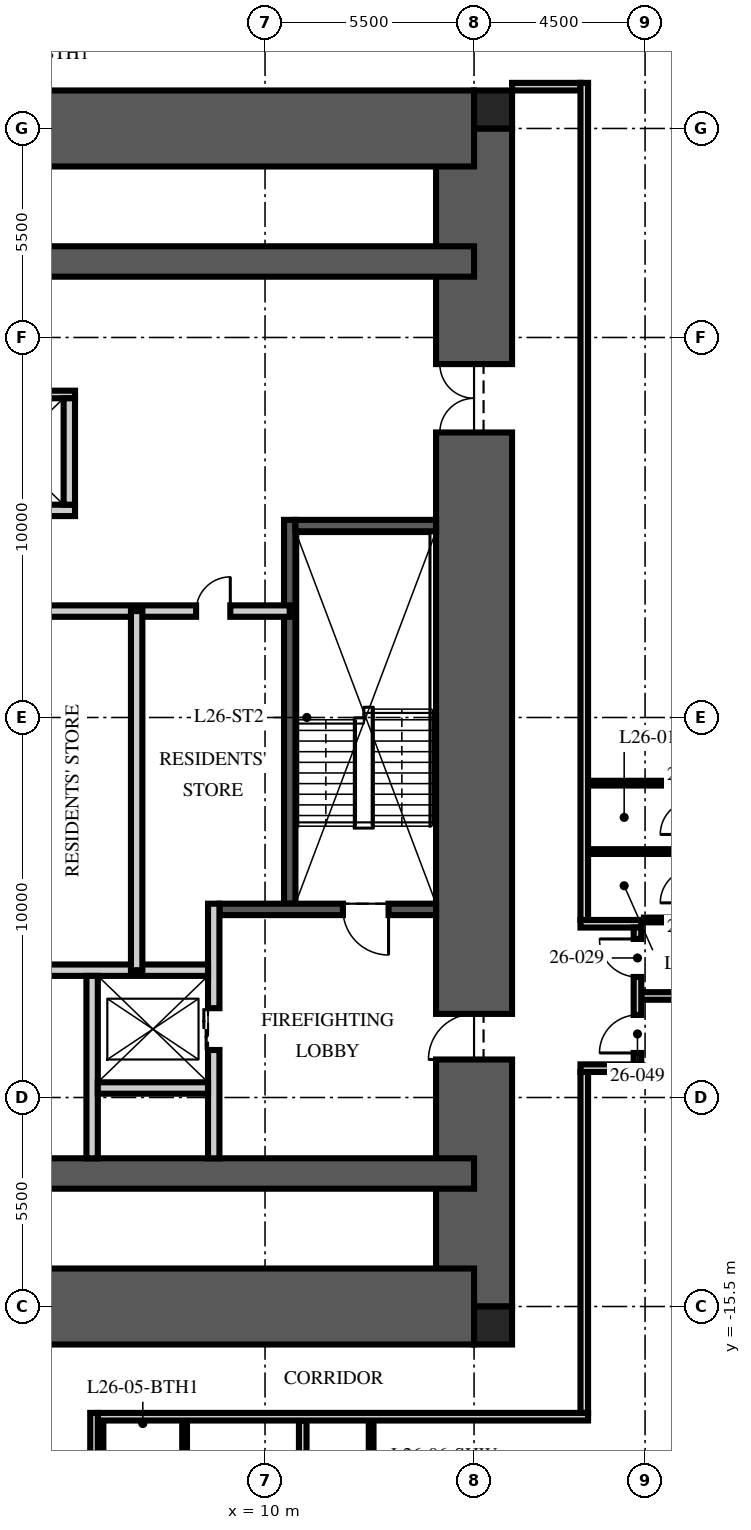
"""IFC4 building model, lengths in metres.
Left out: names, types, materials, properties, quantities, classifications, styles, units other than length and angle.
Written with IfcOpenShell. Run it as: python <this file> out.ifc"""

import sys

from ifc_helpers import new_model, si_unit, direction, frame, frame_2d, origin, origin_2d, place, context, subcontext, project, spatial, rectangle, extrude, element, fill, save


model = new_model("IFC4")
c1 = context("Model", 3, precision=1e-05, world=origin(), true_north=direction((0.0, 1.0)))
c2 = subcontext(c1, "Body", "Model", "MODEL_VIEW")
j1 = project(units=[si_unit("LENGTHUNIT", "METRE"), si_unit("PLANEANGLEUNIT", "RADIAN")], contexts=[c1])
p1 = place(None, origin())
s1 = spatial("IfcSite", under=j1, at=p1, CompositionType="ELEMENT")
p2 = place(p1, origin())
s2 = spatial("IfcBuilding", under=s1, at=p2, CompositionType="ELEMENT")
p3 = place(p2, frame((0.0, 0.0, 107.25)))
s3 = spatial("IfcBuildingStorey", under=s2, at=p3, CompositionType="ELEMENT", Elevation=107.25)
p4 = place(p3, frame((15.5, -15.5, -0.25), z_axis=(0.0, 0.0, 1.0), x_axis=(0.0, 1.0, 0.0)))
e1 = element("IfcWall", 1, at=p4, inside=s3, PredefinedType="SHEAR", context=c2, shape_type="SweptSolid", body=[
    extrude(rectangle(XDim=31.0, YDim=2.0, at=frame_2d((15.5, 0.0))), origin(), (0.0, 0.0, 1.0), 3.75),
])
p5 = place(p4, frame((6.5, 0.0, 0.25)))
e2 = element("IfcOpeningElement", 2, at=p5, cuts=e1, PredefinedType="OPENING", context=c2, shape_type="SweptSolid", body=[
    extrude(rectangle(XDim=1.2, YDim=2.1, at=frame_2d((0.6, 1.05))), frame((0.0, 1.01, 0.0), z_axis=(0.0, -1.0, 0.0), x_axis=(1.0, 0.0, 0.0)), (0.0, 0.0, 1.0), 2.02),
])
p6 = place(p4, frame((23.0, 0.0, 0.25)))
e3 = element("IfcOpeningElement", 3, at=p6, cuts=e1, PredefinedType="OPENING", context=c2, shape_type="SweptSolid", body=[
    extrude(rectangle(XDim=1.8, YDim=2.1, at=frame_2d((0.9, 1.05))), frame((0.0, 1.01, 0.0), z_axis=(0.0, -1.0, 0.0), x_axis=(1.0, 0.0, 0.0)), (0.0, 0.0, 1.0), 2.02),
])
p7 = place(p3, frame((-15.5, 15.5, -0.25), z_axis=(0.0, 0.0, 1.0), x_axis=(1.0, 0.0, 0.0)))
e4 = element("IfcWall", 4, at=p7, inside=s3, PredefinedType="SHEAR", context=c2, shape_type="SweptSolid", body=[
    extrude(rectangle(XDim=31.0, YDim=2.0, at=frame_2d((15.5, 0.0))), origin(), (0.0, 0.0, 1.0), 3.75),
])
p8 = place(p7, frame((5.0, 0.0, 0.25)))
e5 = element("IfcOpeningElement", 5, at=p8, cuts=e4, PredefinedType="OPENING", context=c2, shape_type="SweptSolid", body=[
    extrude(rectangle(XDim=1.0, YDim=2.1, at=frame_2d((0.5, 1.05))), frame((0.0, 1.01, 0.0), z_axis=(0.0, -1.0, 0.0), x_axis=(1.0, 0.0, 0.0)), (0.0, 0.0, 1.0), 2.02),
])
p9 = place(p3, frame((-15.5, -15.5, -0.25), z_axis=(0.0, 0.0, 1.0), x_axis=(1.0, 0.0, 0.0)))
e6 = element("IfcWall", 6, at=p9, inside=s3, PredefinedType="SHEAR", context=c2, shape_type="SweptSolid", body=[
    extrude(rectangle(XDim=31.0, YDim=2.0, at=frame_2d((15.5, 0.0))), origin(), (0.0, 0.0, 1.0), 3.75),
])
p10 = place(p9, frame((10.4, 0.0, 0.25)))
e7 = element("IfcOpeningElement", 7, at=p10, cuts=e6, PredefinedType="OPENING", context=c2, shape_type="SweptSolid", body=[
    extrude(rectangle(XDim=1.1, YDim=2.1, at=frame_2d((0.55, 1.05))), frame((0.0, 1.01, 0.0), z_axis=(0.0, -1.0, 0.0), x_axis=(1.0, 0.0, 0.0)), (0.0, 0.0, 1.0), 2.02),
])
p11 = place(p9, frame((13.5, 0.0, 0.25)))
e8 = element("IfcOpeningElement", 8, at=p11, cuts=e6, PredefinedType="OPENING", context=c2, shape_type="SweptSolid", body=[
    extrude(rectangle(XDim=1.1, YDim=2.1, at=frame_2d((0.55, 1.05))), frame((0.0, 1.01, 0.0), z_axis=(0.0, -1.0, 0.0), x_axis=(1.0, 0.0, 0.0)), (0.0, 0.0, 1.0), 2.02),
])
p12 = place(p9, frame((16.6, 0.0, 0.25)))
e9 = element("IfcOpeningElement", 9, at=p12, cuts=e6, PredefinedType="OPENING", context=c2, shape_type="SweptSolid", body=[
    extrude(rectangle(XDim=1.1, YDim=2.1, at=frame_2d((0.55, 1.05))), frame((0.0, 1.01, 0.0), z_axis=(0.0, -1.0, 0.0), x_axis=(1.0, 0.0, 0.0)), (0.0, 0.0, 1.0), 2.02),
])
for number, where, z_axis, x_axis in (
    (10, (-15.5, 12.0, -0.25), (0.0, 0.0, 1.0), (1.0, 0.0, 0.0)),
    (11, (-15.5, -12.0, -0.25), (0.0, 0.0, 1.0), (1.0, 0.0, 0.0)),
):
    element("IfcWall", number, at=place(p3, frame(where, z_axis=z_axis, x_axis=x_axis)), inside=s3, PredefinedType="SHEAR", context=c2, shape_type="SweptSolid", body=[
        extrude(rectangle(XDim=31.0, YDim=0.8, at=frame_2d((15.5, 0.0))), origin(), (0.0, 0.0, 1.0), 3.75),
    ])
for number, where, z_axis, x_axis in (
    (12, (16.0, 16.0, -0.25), (0.0, 0.0, 1.0), (1.0, 0.0, 0.0)),
    (13, (16.0, -16.0, -0.25), (0.0, 0.0, 1.0), (1.0, 0.0, 0.0)),
):
    element("IfcColumn", number, at=place(p3, frame(where, z_axis=z_axis, x_axis=x_axis)), inside=s3, PredefinedType="COLUMN", context=c2, shape_type="SweptSolid", body=[
        extrude(rectangle(XDim=1.0, YDim=1.0, at=origin_2d()), origin(), (0.0, 0.0, 1.0), 3.75),
    ])
p13 = place(p3, frame((10.65, -4.9, 0.0), z_axis=(0.0, 0.0, 1.0), x_axis=(0.0, 1.0, 0.0)))
e14 = element("IfcWall", 14, at=p13, inside=s3, PredefinedType="SOLIDWALL", context=c2, shape_type="SweptSolid", body=[
    extrude(rectangle(XDim=10.1, YDim=0.3, at=frame_2d((5.05, 0.0))), origin(), (0.0, 0.0, 1.0), 3.5),
])
p14 = place(p3, frame((14.5, -5.05, 0.0), z_axis=(0.0, 0.0, 1.0), x_axis=(-1.0, 0.0, 0.0)))
e15 = element("IfcWall", 15, at=p14, inside=s3, PredefinedType="SOLIDWALL", context=c2, shape_type="SweptSolid", body=[
    extrude(rectangle(XDim=5.7, YDim=0.3, at=frame_2d((2.85, 0.0))), origin(), (0.0, 0.0, 1.0), 3.5),
])
p15 = place(p14, frame((1.25, 0.0, 0.0)))
e16 = element("IfcOpeningElement", 16, at=p15, cuts=e15, PredefinedType="OPENING", context=c2, shape_type="SweptSolid", body=[
    extrude(rectangle(XDim=1.2, YDim=2.1, at=frame_2d((0.6, 1.05))), frame((0.0, 0.16, 0.0), z_axis=(0.0, -1.0, 0.0), x_axis=(1.0, 0.0, 0.0)), (0.0, 0.0, 1.0), 0.32),
])
p16 = place(p3, frame((14.5, 5.05, 0.0), z_axis=(0.0, 0.0, 1.0), x_axis=(-1.0, 0.0, 0.0)))
e17 = element("IfcWall", 17, at=p16, inside=s3, PredefinedType="SOLIDWALL", context=c2, shape_type="SweptSolid", body=[
    extrude(rectangle(XDim=3.7, YDim=0.3, at=frame_2d((1.85, 0.0))), origin(), (0.0, 0.0, 1.0), 3.5),
])
p17 = place(p3, frame((8.65, -11.6, 0.0), z_axis=(0.0, 0.0, 1.0), x_axis=(0.0, 1.0, 0.0)))
e18 = element("IfcWall", 18, at=p17, inside=s3, PredefinedType="PARTITIONING", context=c2, shape_type="SweptSolid", body=[
    extrude(rectangle(XDim=6.7, YDim=0.3, at=frame_2d((3.35, 0.0))), origin(), (0.0, 0.0, 1.0), 3.5),
])
p18 = place(p17, frame((2.85, 0.0, 0.0)))
e19 = element("IfcOpeningElement", 19, at=p18, cuts=e18, PredefinedType="OPENING", context=c2, shape_type="SweptSolid", body=[
    extrude(rectangle(XDim=1.1, YDim=2.1, at=frame_2d((0.55, 1.05))), frame((0.0, 0.16, 0.0), z_axis=(0.0, -1.0, 0.0), x_axis=(1.0, 0.0, 0.0)), (0.0, 0.0, 1.0), 0.32),
])
p19 = place(p3, frame((-8.5, -6.65, 0.0), z_axis=(0.0, 0.0, 1.0), x_axis=(1.0, 0.0, 0.0)))
e20 = element("IfcWall", 20, at=p19, inside=s3, PredefinedType="PARTITIONING", context=c2, shape_type="SweptSolid", body=[
    extrude(rectangle(XDim=17.0, YDim=0.3, at=frame_2d((8.5, 0.0))), origin(), (0.0, 0.0, 1.0), 3.5),
])
p20 = place(p19, frame((7.8, 0.0, 0.0)))
e21 = element("IfcOpeningElement", 21, at=p20, cuts=e20, PredefinedType="OPENING", context=c2, shape_type="SweptSolid", body=[
    extrude(rectangle(XDim=1.3, YDim=2.4, at=frame_2d((0.65, 1.2))), frame((0.0, 0.16, 0.0), z_axis=(0.0, -1.0, 0.0), x_axis=(1.0, 0.0, 0.0)), (0.0, 0.0, 1.0), 0.32),
])
p21 = place(p19, frame((5.65, 0.0, 0.0)))
e22 = element("IfcOpeningElement", 22, at=p21, cuts=e20, PredefinedType="OPENING", context=c2, shape_type="SweptSolid", body=[
    extrude(rectangle(XDim=0.9, YDim=2.1, at=frame_2d((0.45, 1.05))), frame((0.0, 0.16, 0.0), z_axis=(0.0, -1.0, 0.0), x_axis=(1.0, 0.0, 0.0)), (0.0, 0.0, 1.0), 0.32),
])
p22 = place(p19, frame((10.4, 0.0, 0.0)))
e23 = element("IfcOpeningElement", 23, at=p22, cuts=e20, PredefinedType="OPENING", context=c2, shape_type="SweptSolid", body=[
    extrude(rectangle(XDim=0.9, YDim=2.1, at=frame_2d((0.45, 1.05))), frame((0.0, 0.16, 0.0), z_axis=(0.0, -1.0, 0.0), x_axis=(1.0, 0.0, 0.0)), (0.0, 0.0, 1.0), 0.32),
])
p23 = place(p3, frame((5.45, -11.6, 0.0), z_axis=(0.0, 0.0, 1.0), x_axis=(0.0, 1.0, 0.0)))
e24 = element("IfcWall", 24, at=p23, inside=s3, PredefinedType="PARTITIONING", context=c2, shape_type="SweptSolid", body=[
    extrude(rectangle(XDim=4.8, YDim=0.3, at=frame_2d((2.4, 0.0))), origin(), (0.0, 0.0, 1.0), 3.5),
])
p24 = place(p3, frame((5.6, -9.75, 0.0), z_axis=(0.0, 0.0, 1.0), x_axis=(1.0, 0.0, 0.0)))
e25 = element("IfcWall", 25, at=p24, inside=s3, PredefinedType="PARTITIONING", context=c2, shape_type="SweptSolid", body=[
    extrude(rectangle(XDim=2.9, YDim=0.3, at=frame_2d((1.45, 0.0))), origin(), (0.0, 0.0, 1.0), 3.5),
])
p25 = place(p3, frame((-4.7, 5.45, 0.0), z_axis=(0.0, 0.0, 1.0), x_axis=(1.0, 0.0, 0.0)))
e26 = element("IfcWall", 26, at=p25, inside=s3, PredefinedType="PARTITIONING", context=c2, shape_type="SweptSolid", body=[
    extrude(rectangle(XDim=9.7, YDim=0.3, at=frame_2d((4.85, 0.0))), origin(), (0.0, 0.0, 1.0), 3.5),
])
p26 = place(p3, frame((-4.7, 8.5, 0.0), z_axis=(0.0, 0.0, 1.0), x_axis=(1.0, 0.0, 0.0)))
e27 = element("IfcWall", 27, at=p26, inside=s3, PredefinedType="PARTITIONING", context=c2, shape_type="SweptSolid", body=[
    extrude(rectangle(XDim=9.7, YDim=0.2, at=frame_2d((4.85, 0.0))), origin(), (0.0, 0.0, 1.0), 3.5),
])
p27 = place(p3, frame((4.85, 5.6, 0.0), z_axis=(0.0, 0.0, 1.0), x_axis=(0.0, 1.0, 0.0)))
e28 = element("IfcWall", 28, at=p27, inside=s3, PredefinedType="PARTITIONING", context=c2, shape_type="SweptSolid", body=[
    extrude(rectangle(XDim=2.8, YDim=0.3, at=frame_2d((1.4, 0.0))), origin(), (0.0, 0.0, 1.0), 3.5),
])
p28 = place(p3, frame((-10.65, 2.8, 0.0), z_axis=(0.0, 0.0, 1.0), x_axis=(1.0, 0.0, 0.0)))
e29 = element("IfcWall", 29, at=p28, inside=s3, PredefinedType="PARTITIONING", context=c2, shape_type="SweptSolid", body=[
    extrude(rectangle(XDim=21.3, YDim=0.3, at=frame_2d((10.65, 0.0))), origin(), (0.0, 0.0, 1.0), 3.5),
])
p29 = place(p28, frame((10.05, 0.0, 0.0)))
e30 = element("IfcOpeningElement", 30, at=p29, cuts=e29, PredefinedType="OPENING", context=c2, shape_type="SweptSolid", body=[
    extrude(rectangle(XDim=1.2, YDim=2.1, at=frame_2d((0.6, 1.05))), frame((0.0, 0.16, 0.0), z_axis=(0.0, -1.0, 0.0), x_axis=(1.0, 0.0, 0.0)), (0.0, 0.0, 1.0), 0.32),
])
p30 = place(p28, frame((1.493, 0.0, 0.0)))
e31 = element("IfcOpeningElement", 31, at=p30, cuts=e29, PredefinedType="OPENING", context=c2, shape_type="SweptSolid", body=[
    extrude(rectangle(XDim=0.9, YDim=2.1, at=frame_2d((0.45, 1.05))), frame((0.0, 0.16, 0.0), z_axis=(0.0, -1.0, 0.0), x_axis=(1.0, 0.0, 0.0)), (0.0, 0.0, 1.0), 0.32),
])
p31 = place(p28, frame((18.836, 0.0, 0.0)))
e32 = element("IfcOpeningElement", 32, at=p31, cuts=e29, PredefinedType="OPENING", context=c2, shape_type="SweptSolid", body=[
    extrude(rectangle(XDim=0.9, YDim=2.1, at=frame_2d((0.45, 1.05))), frame((0.0, 0.16, 0.0), z_axis=(0.0, -1.0, 0.0), x_axis=(1.0, 0.0, 0.0)), (0.0, 0.0, 1.0), 0.32),
])
p32 = place(p3, frame((6.622, -6.65, 0.0), z_axis=(0.0, 0.0, 1.0), x_axis=(0.0, 1.0, 0.0)))
e33 = element("IfcWall", 33, at=p32, inside=s3, PredefinedType="PARTITIONING", context=c2, shape_type="SweptSolid", body=[
    extrude(rectangle(XDim=9.45, YDim=0.3, at=frame_2d((4.725, 0.0))), origin(), (0.0, 0.0, 1.0), 3.5),
])
p33 = place(p3, frame((16.5, 16.6, 0.0), z_axis=(0.0, 0.0, 1.0), x_axis=(1.0, 0.0, 0.0)))
e34 = element("IfcWall", 34, at=p33, inside=s3, PredefinedType="PARTITIONING", context=c2, shape_type="SweptSolid", body=[
    extrude(rectangle(XDim=1.8, YDim=0.2, at=frame_2d((0.9, 0.0))), origin(), (0.0, 0.0, 1.0), 2.3),
])
p34 = place(p3, frame((19.9, -7.328, 0.0), z_axis=(0.0, 0.0, 1.0), x_axis=(1.0, 0.0, 0.0)))
e35 = element("IfcWall", 35, at=p34, inside=s3, PredefinedType="PARTITIONING", context=c2, shape_type="SweptSolid", body=[
    extrude(rectangle(XDim=9.25, YDim=0.2, at=frame_2d((4.625, 0.0))), origin(), (0.0, 0.0, 1.0), 2.81),
])
p35 = place(p3, frame((10.992, -18.5, 0.0), z_axis=(0.0, 0.0, 1.0), x_axis=(0.0, -1.0, 0.0)))
e36 = element("IfcWall", 36, at=p35, inside=s3, PredefinedType="PARTITIONING", context=c2, shape_type="SweptSolid", body=[
    extrude(rectangle(XDim=10.65, YDim=0.2, at=frame_2d((5.325, 0.0))), origin(), (0.0, 0.0, 1.0), 2.81),
])
p36 = place(p3, frame((19.97, -5.328, 0.0), z_axis=(0.0, 0.0, 1.0), x_axis=(1.0, 0.0, 0.0)))
e37 = element("IfcWall", 37, at=p36, inside=s3, PredefinedType="PARTITIONING", context=c2, shape_type="SweptSolid", body=[
    extrude(rectangle(XDim=1.33, YDim=0.125, at=frame_2d((0.665, 0.0))), origin(), (0.0, 0.0, 1.0), 3.5),
])
for number, where, z_axis, x_axis in (
    (38, (18.5, -3.528, 0.0), (0.0, 0.0, 1.0), (1.0, 0.0, 0.0)),
    (39, (18.5, -1.728, 0.0), (0.0, 0.0, 1.0), (1.0, 0.0, 0.0)),
    (40, (5.684, -18.5, 0.0), (0.0, 0.0, 1.0), (0.0, -1.0, 0.0)),
    (41, (7.884, -18.5, 0.0), (0.0, 0.0, 1.0), (0.0, -1.0, 0.0)),
    (42, (12.792, -18.5, 0.0), (0.0, 0.0, 1.0), (0.0, -1.0, 0.0)),
):
    element("IfcWall", number, at=place(p3, frame(where, z_axis=z_axis, x_axis=x_axis)), inside=s3, PredefinedType="PARTITIONING", context=c2, shape_type="SweptSolid", body=[
        extrude(rectangle(XDim=2.8, YDim=0.125, at=frame_2d((1.4, 0.0))), origin(), (0.0, 0.0, 1.0), 3.5),
    ])
p37 = place(p3, frame((18.4, -18.3, 0.0), z_axis=(0.0, 0.0, 1.0), x_axis=(0.0, 1.0, 0.0)))
e43 = element("IfcWall", 43, at=p37, inside=s3, PredefinedType="PARTITIONING", context=c2, shape_type="SweptSolid", body=[
    extrude(rectangle(XDim=8.972, YDim=0.2, at=frame_2d((4.486, 0.0))), origin(), (0.0, 0.0, 1.0), 2.3),
])
p38 = place(p3, frame((18.3, -9.228, 0.0), z_axis=(0.0, 0.0, 1.0), x_axis=(1.0, 0.0, 0.0)))
e44 = element("IfcWall", 44, at=p38, inside=s3, PredefinedType="PARTITIONING", context=c2, shape_type="SweptSolid", body=[
    extrude(rectangle(XDim=1.6, YDim=0.2, at=frame_2d((0.8, 0.0))), origin(), (0.0, 0.0, 1.0), 2.7),
])
p39 = place(p3, frame((18.3, -5.428, 0.0), z_axis=(0.0, 0.0, 1.0), x_axis=(1.0, 0.0, 0.0)))
e45 = element("IfcWall", 45, at=p39, inside=s3, PredefinedType="PARTITIONING", context=c2, shape_type="SweptSolid", body=[
    extrude(rectangle(XDim=1.6, YDim=0.2, at=frame_2d((0.8, 0.0))), origin(), (0.0, 0.0, 1.0), 3.5),
])
p40 = place(p3, frame((19.8, -9.128, 0.0), z_axis=(0.0, 0.0, 1.0), x_axis=(0.0, 1.0, 0.0)))
e46 = element("IfcWall", 46, at=p40, inside=s3, PredefinedType="PARTITIONING", context=c2, shape_type="SweptSolid", body=[
    extrude(rectangle(XDim=3.6, YDim=0.2, at=frame_2d((1.8, 0.0))), origin(), (0.0, 0.0, 1.0), 2.7),
])
p41 = place(p40, frame((2.3, 0.0, 0.0)))
e47 = element("IfcOpeningElement", 47, at=p41, cuts=e46, PredefinedType="OPENING", context=c2, shape_type="SweptSolid", body=[
    extrude(rectangle(XDim=1.0, YDim=2.2, at=frame_2d((0.5, 1.1))), frame((0.0, 0.11, 0.0), z_axis=(0.0, -1.0, 0.0), x_axis=(1.0, 0.0, 0.0)), (0.0, 0.0, 1.0), 0.22),
])
p42 = place(p40, frame((0.3, 0.0, 0.0)))
e48 = element("IfcOpeningElement", 48, at=p42, cuts=e46, PredefinedType="OPENING", context=c2, shape_type="SweptSolid", body=[
    extrude(rectangle(XDim=1.0, YDim=2.2, at=frame_2d((0.5, 1.1))), frame((0.0, 0.11, 0.0), z_axis=(0.0, -1.0, 0.0), x_axis=(1.0, 0.0, 0.0)), (0.0, 0.0, 1.0), 0.22),
])
p43 = place(p3, frame((18.4, -5.328, 0.0), z_axis=(0.0, 0.0, 1.0), x_axis=(0.0, 1.0, 0.0)))
e49 = element("IfcWall", 49, at=p43, inside=s3, PredefinedType="PARTITIONING", context=c2, shape_type="SweptSolid", body=[
    extrude(rectangle(XDim=22.028, YDim=0.2, at=frame_2d((11.014, 0.0))), origin(), (0.0, 0.0, 1.0), 2.7),
])
p44 = place(p3, frame((18.5, -18.4, 0.0), z_axis=(0.0, 0.0, 1.0), x_axis=(-1.0, 0.0, 0.0)))
e50 = element("IfcWall", 50, at=p44, inside=s3, PredefinedType="PARTITIONING", context=c2, shape_type="SweptSolid", body=[
    extrude(rectangle(XDim=12.9, YDim=0.2, at=frame_2d((6.45, 0.0))), origin(), (0.0, 0.0, 1.0), 2.3),
])
p45 = place(p3, frame((5.5, -18.3, 0.0), z_axis=(0.0, 0.0, 1.0), x_axis=(0.0, -1.0, 0.0)))
e51 = element("IfcWall", 51, at=p45, inside=s3, PredefinedType="PARTITIONING", context=c2, shape_type="SweptSolid", body=[
    extrude(rectangle(XDim=3.0, YDim=0.2, at=frame_2d((1.5, 0.0))), origin(), (0.0, 0.0, 1.0), 3.5),
])
p46 = place(p15, origin())
e52 = element("IfcDoor", 52, at=p46, inside=s3, OperationType="SINGLE_SWING_LEFT", PredefinedType="DOOR", context=c2, shape_type="SweptSolid", body=[
    extrude(rectangle(XDim=1.2, YDim=2.1, at=frame_2d((0.6, 1.05))), frame((0.0, 0.025, 0.0), z_axis=(0.0, -1.0, 0.0), x_axis=(1.0, 0.0, 0.0)), (0.0, 0.0, 1.0), 0.05),
])
fill(e16, e52)
p47 = place(p5, origin())
e53 = element("IfcDoor", 53, at=p47, inside=s3, OperationType="SINGLE_SWING_LEFT", PredefinedType="DOOR", context=c2, shape_type="SweptSolid", body=[
    extrude(rectangle(XDim=1.2, YDim=2.1, at=frame_2d((0.6, 1.05))), frame((0.0, 0.025, 0.0), z_axis=(0.0, -1.0, 0.0), x_axis=(1.0, 0.0, 0.0)), (0.0, 0.0, 1.0), 0.05),
])
fill(e2, e53)
p48 = place(p6, origin())
e54 = element("IfcDoor", 54, at=p48, inside=s3, OperationType="DOUBLE_DOOR_SINGLE_SWING", PredefinedType="DOOR", context=c2, shape_type="SweptSolid", body=[
    extrude(rectangle(XDim=1.8, YDim=2.1, at=frame_2d((0.9, 1.05))), frame((0.0, 0.025, 0.0), z_axis=(0.0, -1.0, 0.0), x_axis=(1.0, 0.0, 0.0)), (0.0, 0.0, 1.0), 0.05),
])
fill(e3, e54)
p49 = place(p18, origin())
e55 = element("IfcDoor", 55, at=p49, inside=s3, OperationType="DOUBLE_DOOR_SLIDING", PredefinedType="DOOR", context=c2, shape_type="SweptSolid", body=[
    extrude(rectangle(XDim=1.1, YDim=2.1, at=frame_2d((0.55, 1.05))), frame((0.0, 0.025, 0.0), z_axis=(0.0, -1.0, 0.0), x_axis=(1.0, 0.0, 0.0)), (0.0, 0.0, 1.0), 0.05),
])
fill(e19, e55)
p50 = place(p31, origin())
e56 = element("IfcDoor", 56, at=p50, inside=s3, OperationType="SINGLE_SWING_RIGHT", PredefinedType="DOOR", context=c2, shape_type="SweptSolid", body=[
    extrude(rectangle(XDim=0.9, YDim=2.1, at=frame_2d((0.45, 1.05))), frame((0.0, 0.025, 0.0), z_axis=(0.0, -1.0, 0.0), x_axis=(1.0, 0.0, 0.0)), (0.0, 0.0, 1.0), 0.05),
])
fill(e32, e56)
p51 = place(p41, origin())
e57 = element("IfcDoor", 57, at=p51, inside=s3, OperationType="SINGLE_SWING_RIGHT", PredefinedType="DOOR", context=c2, shape_type="SweptSolid", body=[
    extrude(rectangle(XDim=1.0, YDim=2.2, at=frame_2d((0.5, 1.1))), frame((0.0, 0.025, 0.0), z_axis=(0.0, -1.0, 0.0), x_axis=(1.0, 0.0, 0.0)), (0.0, 0.0, 1.0), 0.05),
])
fill(e47, e57)
p52 = place(p42, origin())
e58 = element("IfcDoor", 58, at=p52, inside=s3, OperationType="SINGLE_SWING_LEFT", PredefinedType="DOOR", context=c2, shape_type="SweptSolid", body=[
    extrude(rectangle(XDim=1.0, YDim=2.2, at=frame_2d((0.5, 1.1))), frame((0.0, 0.025, 0.0), z_axis=(0.0, -1.0, 0.0), x_axis=(1.0, 0.0, 0.0)), (0.0, 0.0, 1.0), 0.05),
])
fill(e48, e58)
save(model, sys.argv[1])
